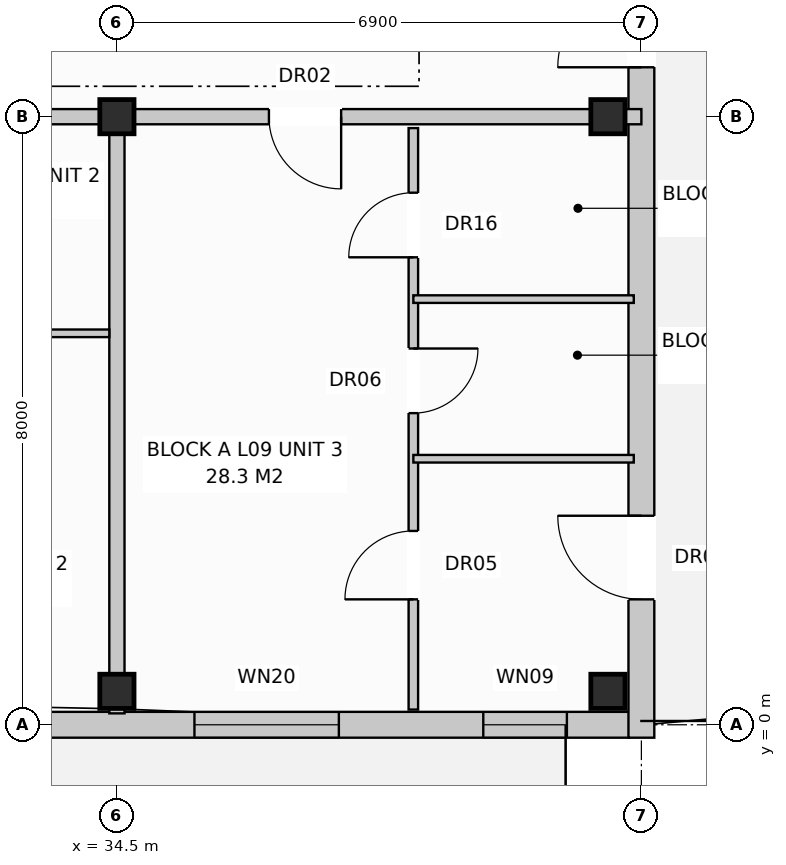
"""IFC4 building model, lengths in metres.
Left out: names, types, materials, properties, quantities, classifications, styles, units other than length and angle.
Written with IfcOpenShell. Run it as: python <this file> out.ifc"""

import sys

from ifc_helpers import new_model, si_unit, direction, frame, frame_2d, origin, origin_with_axes, origin_2d, place, context, subcontext, project, spatial, rectangle, extrude, element, fill, save


model = new_model("IFC4")
c1 = context("Model", 3, precision=1e-05, world=origin(), true_north=direction((0.0, 1.0)))
c2 = subcontext(c1, "Body", "Model", "MODEL_VIEW")
j1 = project(units=[si_unit("LENGTHUNIT", "METRE"), si_unit("PLANEANGLEUNIT", "RADIAN")], contexts=[c1])
p1 = place(None, origin())
s1 = spatial("IfcSite", under=j1, at=p1, CompositionType="ELEMENT")
p2 = place(p1, origin())
s2 = spatial("IfcBuilding", under=s1, at=p2, CompositionType="ELEMENT")
p3 = place(p2, frame((0.0, 0.0, 30.4)))
s3 = spatial("IfcBuildingStorey", under=s2, at=p3, CompositionType="ELEMENT", Elevation=30.4)
for number, where, z_axis, x_axis in (
    (1, (34.5, 0.44, 0.0), (0.0, 0.0, 1.0), (1.0, 0.0, 0.0)),
    (2, (34.5, 8.0, 0.0), (0.0, 0.0, 1.0), (1.0, 0.0, 0.0)),
    (3, (40.96, 0.44, 0.0), (0.0, 0.0, 1.0), (1.0, 0.0, 0.0)),
    (4, (40.96, 8.0, 0.0), (0.0, 0.0, 1.0), (1.0, 0.0, 0.0)),
):
    element("IfcColumn", number, at=place(p3, frame(where, z_axis=z_axis, x_axis=x_axis)), inside=s3, PredefinedType="COLUMN", context=c2, shape_type="SweptSolid", body=[
        extrude(rectangle(XDim=0.45, YDim=0.45, at=origin_2d()), origin(), (0.0, 0.0, 1.0), 3.2),
    ])
p4 = place(p3, frame((0.16, 0.0, 0.0), z_axis=(0.0, 0.0, 1.0), x_axis=(1.0, 0.0, 0.0)))
e5 = element("IfcWall", 5, at=p4, inside=s3, PredefinedType="STANDARD", context=c2, shape_type="SweptSolid", body=[
    extrude(rectangle(XDim=41.08, YDim=0.34, at=frame_2d((20.54, 0.0))), origin(), (0.0, 0.0, 1.0), 2.96),
])
p5 = place(p4, frame((3.807, 0.0, 0.0)))
e6 = element("IfcOpeningElement", 6, at=p5, cuts=e5, PredefinedType="OPENING", context=c2, shape_type="SweptSolid", body=[
    extrude(rectangle(XDim=0.95, YDim=2.1, at=frame_2d((0.475, 1.05))), frame((0.0, 0.182, 0.0), z_axis=(0.0, -1.0, 0.0), x_axis=(1.0, 0.0, 0.0)), (0.0, 0.0, 1.0), 0.364),
])
p6 = place(p4, frame((18.707, 0.0, 0.0)))
e7 = element("IfcOpeningElement", 7, at=p6, cuts=e5, PredefinedType="OPENING", context=c2, shape_type="SweptSolid", body=[
    extrude(rectangle(XDim=0.95, YDim=2.1, at=frame_2d((0.475, 1.05))), frame((0.0, 0.182, 0.0), z_axis=(0.0, -1.0, 0.0), x_axis=(1.0, 0.0, 0.0)), (0.0, 0.0, 1.0), 0.364),
])
p7 = place(p4, frame((29.107, 0.0, 0.0)))
e8 = element("IfcOpeningElement", 8, at=p7, cuts=e5, PredefinedType="OPENING", context=c2, shape_type="SweptSolid", body=[
    extrude(rectangle(XDim=0.95, YDim=2.1, at=frame_2d((0.475, 1.05))), frame((0.0, 0.182, 0.0), z_axis=(0.0, -1.0, 0.0), x_axis=(1.0, 0.0, 0.0)), (0.0, 0.0, 1.0), 0.364),
])
p8 = place(p4, frame((1.61, 0.0, 0.8)))
e9 = element("IfcOpeningElement", 9, at=p8, cuts=e5, PredefinedType="OPENING", context=c2, shape_type="SweptSolid", body=[
    extrude(rectangle(XDim=1.8, YDim=1.7, at=frame_2d((0.9, 0.85))), frame((0.0, 0.182, 0.0), z_axis=(0.0, -1.0, 0.0), x_axis=(1.0, 0.0, 0.0)), (0.0, 0.0, 1.0), 0.364),
])
p9 = place(p4, frame((7.242, 0.0, 0.72)))
e10 = element("IfcOpeningElement", 10, at=p9, cuts=e5, PredefinedType="OPENING", context=c2, shape_type="SweptSolid", body=[
    extrude(rectangle(XDim=1.9, YDim=1.85, at=frame_2d((0.95, 0.925))), frame((0.0, 0.182, 0.0), z_axis=(0.0, -1.0, 0.0), x_axis=(1.0, 0.0, 0.0)), (0.0, 0.0, 1.0), 0.364),
])
p10 = place(p4, frame((10.86, 0.0, 0.72)))
e11 = element("IfcOpeningElement", 11, at=p10, cuts=e5, PredefinedType="OPENING", context=c2, shape_type="SweptSolid", body=[
    extrude(rectangle(XDim=1.1, YDim=1.5, at=frame_2d((0.55, 0.75))), frame((0.0, 0.182, 0.0), z_axis=(0.0, -1.0, 0.0), x_axis=(1.0, 0.0, 0.0)), (0.0, 0.0, 1.0), 0.364),
])
p11 = place(p4, frame((15.91, 0.0, 0.8)))
e12 = element("IfcOpeningElement", 12, at=p11, cuts=e5, PredefinedType="OPENING", context=c2, shape_type="SweptSolid", body=[
    extrude(rectangle(XDim=1.8, YDim=1.7, at=frame_2d((0.9, 0.85))), frame((0.0, 0.182, 0.0), z_axis=(0.0, -1.0, 0.0), x_axis=(1.0, 0.0, 0.0)), (0.0, 0.0, 1.0), 0.364),
])
p12 = place(p4, frame((21.56, 0.0, 0.72)))
e13 = element("IfcOpeningElement", 13, at=p12, cuts=e5, PredefinedType="OPENING", context=c2, shape_type="SweptSolid", body=[
    extrude(rectangle(XDim=1.9, YDim=1.85, at=frame_2d((0.95, 0.925))), frame((0.0, 0.182, 0.0), z_axis=(0.0, -1.0, 0.0), x_axis=(1.0, 0.0, 0.0)), (0.0, 0.0, 1.0), 0.364),
])
p13 = place(p4, frame((25.61, 0.0, 0.72)))
e14 = element("IfcOpeningElement", 14, at=p13, cuts=e5, PredefinedType="OPENING", context=c2, shape_type="SweptSolid", body=[
    extrude(rectangle(XDim=1.1, YDim=1.5, at=frame_2d((0.55, 0.75))), frame((0.0, 0.182, 0.0), z_axis=(0.0, -1.0, 0.0), x_axis=(1.0, 0.0, 0.0)), (0.0, 0.0, 1.0), 0.364),
])
p14 = place(p4, frame((31.41, 0.0, 0.8)))
e15 = element("IfcOpeningElement", 15, at=p14, cuts=e5, PredefinedType="OPENING", context=c2, shape_type="SweptSolid", body=[
    extrude(rectangle(XDim=1.8, YDim=1.7, at=frame_2d((0.9, 0.85))), frame((0.0, 0.182, 0.0), z_axis=(0.0, -1.0, 0.0), x_axis=(1.0, 0.0, 0.0)), (0.0, 0.0, 1.0), 0.364),
])
p15 = place(p4, frame((35.36, 0.0, 0.72)))
e16 = element("IfcOpeningElement", 16, at=p15, cuts=e5, PredefinedType="OPENING", context=c2, shape_type="SweptSolid", body=[
    extrude(rectangle(XDim=1.9, YDim=1.85, at=frame_2d((0.95, 0.925))), frame((0.0, 0.182, 0.0), z_axis=(0.0, -1.0, 0.0), x_axis=(1.0, 0.0, 0.0)), (0.0, 0.0, 1.0), 0.364),
])
p16 = place(p4, frame((39.16, 0.0, 0.72)))
e17 = element("IfcOpeningElement", 17, at=p16, cuts=e5, PredefinedType="OPENING", context=c2, shape_type="SweptSolid", body=[
    extrude(rectangle(XDim=1.1, YDim=1.5, at=frame_2d((0.55, 0.75))), frame((0.0, 0.182, 0.0), z_axis=(0.0, -1.0, 0.0), x_axis=(1.0, 0.0, 0.0)), (0.0, 0.0, 1.0), 0.364),
])
p17 = place(p3, frame((41.4, -0.17, 0.0), z_axis=(0.0, 0.0, 1.0), x_axis=(0.0, 1.0, 0.0)))
e18 = element("IfcWall", 18, at=p17, inside=s3, PredefinedType="STANDARD", context=c2, shape_type="SweptSolid", body=[
    extrude(rectangle(XDim=18.74, YDim=0.34, at=frame_2d((9.37, 0.0))), origin(), (0.0, 0.0, 1.0), 2.96),
])
p18 = place(p17, frame((8.82, 0.0, 0.0)))
e19 = element("IfcOpeningElement", 19, at=p18, cuts=e18, PredefinedType="OPENING", context=c2, shape_type="SweptSolid", body=[
    extrude(rectangle(XDim=1.1, YDim=2.1, at=frame_2d((0.55, 1.05))), frame((0.0, 0.182, 0.0), z_axis=(0.0, -1.0, 0.0), x_axis=(1.0, 0.0, 0.0)), (0.0, 0.0, 1.0), 0.364),
])
p19 = place(p17, frame((1.82, 0.0, 0.0)))
e20 = element("IfcOpeningElement", 20, at=p19, cuts=e18, PredefinedType="OPENING", context=c2, shape_type="SweptSolid", body=[
    extrude(rectangle(XDim=1.1, YDim=2.1, at=frame_2d((0.55, 1.05))), frame((0.0, 0.182, 0.0), z_axis=(0.0, -1.0, 0.0), x_axis=(1.0, 0.0, 0.0)), (0.0, 0.0, 1.0), 0.364),
])
p20 = place(p17, frame((15.92, 0.0, 0.72)))
e21 = element("IfcOpeningElement", 21, at=p20, cuts=e18, PredefinedType="OPENING", context=c2, shape_type="SweptSolid", body=[
    extrude(rectangle(XDim=1.1, YDim=1.5, at=frame_2d((0.55, 0.75))), frame((0.0, 0.182, 0.0), z_axis=(0.0, -1.0, 0.0), x_axis=(1.0, 0.0, 0.0)), (0.0, 0.0, 1.0), 0.364),
])
p21 = place(p3, frame((34.5, 7.85, 0.0), z_axis=(0.0, 0.0, 1.0), x_axis=(0.0, -1.0, 0.0)))
e22 = element("IfcWall", 22, at=p21, inside=s3, PredefinedType="PARTITIONING", context=c2, shape_type="SweptSolid", body=[
    extrude(rectangle(XDim=7.7, YDim=0.2, at=frame_2d((3.85, 0.0))), origin(), (0.0, 0.0, 1.0), 2.4),
])
p22 = place(p3, frame((13.8, 8.0, 0.0), z_axis=(0.0, 0.0, 1.0), x_axis=(1.0, 0.0, 0.0)))
e23 = element("IfcWall", 23, at=p22, inside=s3, PredefinedType="PARTITIONING", context=c2, shape_type="SweptSolid", body=[
    extrude(rectangle(XDim=20.7, YDim=0.2, at=frame_2d((10.35, 0.0))), origin(), (0.0, 0.0, 1.0), 2.4),
])
p23 = place(p22, frame((2.4, 0.0, 0.0)))
e24 = element("IfcOpeningElement", 24, at=p23, cuts=e23, PredefinedType="OPENING", context=c2, shape_type="SweptSolid", body=[
    extrude(rectangle(XDim=0.95, YDim=2.15, at=frame_2d((0.475, 1.075))), frame((0.0, 0.112, 0.0), z_axis=(0.0, -1.0, 0.0), x_axis=(1.0, 0.0, 0.0)), (0.0, 0.0, 1.0), 0.224),
])
p24 = place(p3, frame((20.1, 5.15, 0.0), z_axis=(0.0, 0.0, 1.0), x_axis=(1.0, 0.0, 0.0)))
e25 = element("IfcWall", 25, at=p24, inside=s3, PredefinedType="PARTITIONING", context=c2, shape_type="SweptSolid", body=[
    extrude(rectangle(XDim=14.3, YDim=0.1, at=frame_2d((7.15, 0.0))), origin(), (0.0, 0.0, 1.0), 2.96),
])
p25 = place(p24, frame((1.6, 0.0, 0.0)))
e26 = element("IfcOpeningElement", 26, at=p25, cuts=e25, PredefinedType="OPENING", context=c2, shape_type="SweptSolid", body=[
    extrude(rectangle(XDim=0.9, YDim=2.1, at=frame_2d((0.45, 1.05))), frame((0.0, 0.062, 0.0), z_axis=(0.0, -1.0, 0.0), x_axis=(1.0, 0.0, 0.0)), (0.0, 0.0, 1.0), 0.124),
])
p26 = place(p24, frame((5.1, 0.0, 0.0)))
e27 = element("IfcOpeningElement", 27, at=p26, cuts=e25, PredefinedType="OPENING", context=c2, shape_type="SweptSolid", body=[
    extrude(rectangle(XDim=0.85, YDim=2.05, at=frame_2d((0.425, 1.025))), frame((0.0, 0.062, 0.0), z_axis=(0.0, -1.0, 0.0), x_axis=(1.0, 0.0, 0.0)), (0.0, 0.0, 1.0), 0.124),
])
p27 = place(p24, frame((8.2, 0.0, 0.0)))
e28 = element("IfcOpeningElement", 28, at=p27, cuts=e25, PredefinedType="OPENING", context=c2, shape_type="SweptSolid", body=[
    extrude(rectangle(XDim=0.85, YDim=2.05, at=frame_2d((0.425, 1.025))), frame((0.0, 0.062, 0.0), z_axis=(0.0, -1.0, 0.0), x_axis=(1.0, 0.0, 0.0)), (0.0, 0.0, 1.0), 0.124),
])
p28 = place(p24, frame((11.6, 0.0, 0.0)))
e29 = element("IfcOpeningElement", 29, at=p28, cuts=e25, PredefinedType="OPENING", context=c2, shape_type="SweptSolid", body=[
    extrude(rectangle(XDim=0.85, YDim=2.05, at=frame_2d((0.425, 1.025))), frame((0.0, 0.062, 0.0), z_axis=(0.0, -1.0, 0.0), x_axis=(1.0, 0.0, 0.0)), (0.0, 0.0, 1.0), 0.124),
])
p29 = place(p3, frame((34.5, 8.0, 0.0), z_axis=(0.0, 0.0, 1.0), x_axis=(1.0, 0.0, 0.0)))
e30 = element("IfcWall", 30, at=p29, inside=s3, PredefinedType="PARTITIONING", context=c2, shape_type="SweptSolid", body=[
    extrude(rectangle(XDim=6.9, YDim=0.2, at=frame_2d((3.45, 0.0))), origin(), (0.0, 0.0, 1.0), 2.4),
])
p30 = place(p29, frame((2.0, 0.0, 0.0)))
e31 = element("IfcOpeningElement", 31, at=p30, cuts=e30, PredefinedType="OPENING", context=c2, shape_type="SweptSolid", body=[
    extrude(rectangle(XDim=0.95, YDim=2.15, at=frame_2d((0.475, 1.075))), frame((0.0, 0.112, 0.0), z_axis=(0.0, -1.0, 0.0), x_axis=(1.0, 0.0, 0.0)), (0.0, 0.0, 1.0), 0.224),
])
p31 = place(p3, frame((38.4, 7.85, 0.0), z_axis=(0.0, 0.0, 1.0), x_axis=(0.0, -1.0, 0.0)))
e32 = element("IfcWall", 32, at=p31, inside=s3, PredefinedType="PARTITIONING", context=c2, shape_type="SweptSolid", body=[
    extrude(rectangle(XDim=7.65, YDim=0.125, at=frame_2d((3.825, 0.0))), origin(), (0.0, 0.0, 1.0), 2.96),
])
p32 = place(p31, frame((0.85, 0.0, 0.0)))
e33 = element("IfcOpeningElement", 33, at=p32, cuts=e32, PredefinedType="OPENING", context=c2, shape_type="SweptSolid", body=[
    extrude(rectangle(XDim=0.85, YDim=2.1, at=frame_2d((0.425, 1.05))), frame((0.0, 0.074, 0.0), z_axis=(0.0, -1.0, 0.0), x_axis=(1.0, 0.0, 0.0)), (0.0, 0.0, 1.0), 0.149),
])
p33 = place(p31, frame((2.9, 0.0, 0.0)))
e34 = element("IfcOpeningElement", 34, at=p33, cuts=e32, PredefinedType="OPENING", context=c2, shape_type="SweptSolid", body=[
    extrude(rectangle(XDim=0.85, YDim=2.05, at=frame_2d((0.425, 1.025))), frame((0.0, 0.074, 0.0), z_axis=(0.0, -1.0, 0.0), x_axis=(1.0, 0.0, 0.0)), (0.0, 0.0, 1.0), 0.149),
])
p34 = place(p31, frame((5.3, 0.0, 0.0)))
e35 = element("IfcOpeningElement", 35, at=p34, cuts=e32, PredefinedType="OPENING", context=c2, shape_type="SweptSolid", body=[
    extrude(rectangle(XDim=0.9, YDim=2.1, at=frame_2d((0.45, 1.05))), frame((0.0, 0.074, 0.0), z_axis=(0.0, -1.0, 0.0), x_axis=(1.0, 0.0, 0.0)), (0.0, 0.0, 1.0), 0.149),
])
for number, where, z_axis, x_axis in (
    (36, (38.4, 5.6, 0.0), (0.0, 0.0, 1.0), (1.0, 0.0, 0.0)),
    (37, (38.4, 3.5, 0.0), (0.0, 0.0, 1.0), (1.0, 0.0, 0.0)),
):
    element("IfcWall", number, at=place(p3, frame(where, z_axis=z_axis, x_axis=x_axis)), inside=s3, PredefinedType="PARTITIONING", context=c2, shape_type="SweptSolid", body=[
        extrude(rectangle(XDim=2.9, YDim=0.1, at=frame_2d((1.45, 0.0))), origin(), (0.0, 0.0, 1.0), 2.96),
    ])
p35 = place(p15, origin_with_axes())
e38 = element("IfcWindow", 38, at=p35, inside=s3, PartitioningType="SINGLE_PANEL", PredefinedType="WINDOW", context=c2, shape_type="SweptSolid", body=[
    extrude(rectangle(XDim=1.9, YDim=1.85, at=frame_2d((0.95, 0.925))), frame((0.0, 0.03, 0.0), z_axis=(0.0, -1.0, 0.0), x_axis=(1.0, 0.0, 0.0)), (0.0, 0.0, 1.0), 0.06),
])
fill(e16, e38)
p36 = place(p16, origin_with_axes())
e39 = element("IfcWindow", 39, at=p36, inside=s3, PartitioningType="SINGLE_PANEL", PredefinedType="WINDOW", context=c2, shape_type="SweptSolid", body=[
    extrude(rectangle(XDim=1.1, YDim=1.5, at=frame_2d((0.55, 0.75))), frame((0.0, 0.03, 0.0), z_axis=(0.0, -1.0, 0.0), x_axis=(1.0, 0.0, 0.0)), (0.0, 0.0, 1.0), 0.06),
])
fill(e17, e39)
p37 = place(p18, origin_with_axes())
e40 = element("IfcDoor", 40, at=p37, inside=s3, OperationType="SINGLE_SWING_LEFT", PredefinedType="DOOR", context=c2, shape_type="SweptSolid", body=[
    extrude(rectangle(XDim=1.1, YDim=2.1, at=frame_2d((0.55, 1.05))), frame((0.0, 0.025, 0.0), z_axis=(0.0, -1.0, 0.0), x_axis=(1.0, 0.0, 0.0)), (0.0, 0.0, 1.0), 0.05),
])
fill(e19, e40)
p38 = place(p19, origin_with_axes())
e41 = element("IfcDoor", 41, at=p38, inside=s3, OperationType="SINGLE_SWING_RIGHT", PredefinedType="DOOR", context=c2, shape_type="SweptSolid", body=[
    extrude(rectangle(XDim=1.1, YDim=2.1, at=frame_2d((0.55, 1.05))), frame((0.0, 0.025, 0.0), z_axis=(0.0, -1.0, 0.0), x_axis=(1.0, 0.0, 0.0)), (0.0, 0.0, 1.0), 0.05),
])
fill(e20, e41)
p39 = place(p30, frame((0.95, 0.0, 0.0), z_axis=(0.0, 0.0, 1.0), x_axis=(-1.0, 0.0, 0.0)))
e42 = element("IfcDoor", 42, at=p39, inside=s3, OperationType="SINGLE_SWING_RIGHT", PredefinedType="DOOR", context=c2, shape_type="SweptSolid", body=[
    extrude(rectangle(XDim=0.95, YDim=2.15, at=frame_2d((0.475, 1.075))), frame((0.0, 0.025, 0.0), z_axis=(0.0, -1.0, 0.0), x_axis=(1.0, 0.0, 0.0)), (0.0, 0.0, 1.0), 0.05),
])
fill(e31, e42)
p40 = place(p32, frame((0.85, 0.0, 0.0), z_axis=(0.0, 0.0, 1.0), x_axis=(-1.0, 0.0, 0.0)))
e43 = element("IfcDoor", 43, at=p40, inside=s3, OperationType="SINGLE_SWING_RIGHT", PredefinedType="DOOR", context=c2, shape_type="SweptSolid", body=[
    extrude(rectangle(XDim=0.85, YDim=2.1, at=frame_2d((0.425, 1.05))), frame((0.0, 0.025, 0.0), z_axis=(0.0, -1.0, 0.0), x_axis=(1.0, 0.0, 0.0)), (0.0, 0.0, 1.0), 0.05),
])
fill(e33, e43)
p41 = place(p33, origin_with_axes())
e44 = element("IfcDoor", 44, at=p41, inside=s3, OperationType="SINGLE_SWING_LEFT", PredefinedType="DOOR", context=c2, shape_type="SweptSolid", body=[
    extrude(rectangle(XDim=0.85, YDim=2.05, at=frame_2d((0.425, 1.025))), frame((0.0, 0.025, 0.0), z_axis=(0.0, -1.0, 0.0), x_axis=(1.0, 0.0, 0.0)), (0.0, 0.0, 1.0), 0.05),
])
fill(e34, e44)
p42 = place(p34, frame((0.9, 0.0, 0.0), z_axis=(0.0, 0.0, 1.0), x_axis=(-1.0, 0.0, 0.0)))
e45 = element("IfcDoor", 45, at=p42, inside=s3, OperationType="SINGLE_SWING_RIGHT", PredefinedType="DOOR", context=c2, shape_type="SweptSolid", body=[
    extrude(rectangle(XDim=0.9, YDim=2.1, at=frame_2d((0.45, 1.05))), frame((0.0, 0.025, 0.0), z_axis=(0.0, -1.0, 0.0), x_axis=(1.0, 0.0, 0.0)), (0.0, 0.0, 1.0), 0.05),
])
fill(e35, e45)
save(model, sys.argv[1])
